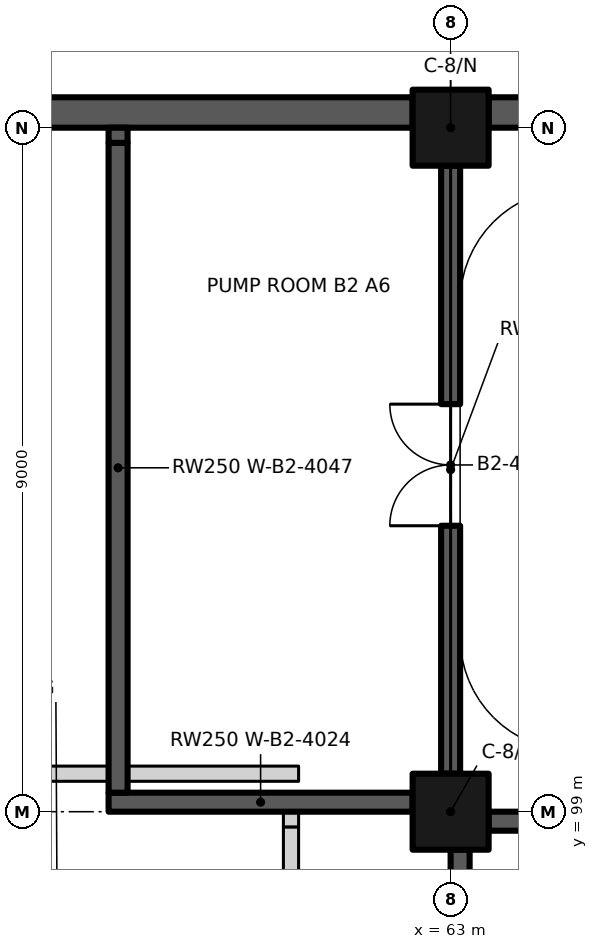
"""IFC4 building model, lengths in metres.
Left out: names, types, materials, properties, quantities, classifications, styles, units other than length and angle.
Written with IfcOpenShell. Run it as: python <this file> out.ifc"""

import sys

from ifc_helpers import new_model, si_unit, direction, frame, frame_2d, origin, origin_2d, place, context, subcontext, project, spatial, rectangle, extrude, element, fill, save


model = new_model("IFC4")
c1 = context("Model", 3, precision=1e-05, world=origin(), true_north=direction((0.0, 1.0)))
c2 = subcontext(c1, "Body", "Model", "MODEL_VIEW")
j1 = project(units=[si_unit("LENGTHUNIT", "METRE"), si_unit("PLANEANGLEUNIT", "RADIAN")], contexts=[c1])
p1 = place(None, origin())
s1 = spatial("IfcSite", under=j1, at=p1, CompositionType="ELEMENT")
p2 = place(p1, origin())
s2 = spatial("IfcBuilding", under=s1, at=p2, CompositionType="ELEMENT")
p3 = place(p2, frame((0.0, 0.0, -9.9)))
s3 = spatial("IfcBuildingStorey", under=s2, at=p3, CompositionType="ELEMENT", Elevation=-9.9)
p4 = place(p3, frame((54.5, 108.2, -0.5), z_axis=(0.0, 0.0, 1.0), x_axis=(1.0, 0.0, 0.0)))
e1 = element("IfcWall", 1, at=p4, inside=s3, PredefinedType="SOLIDWALL", context=c2, shape_type="SweptSolid", body=[
    extrude(rectangle(XDim=8.0, YDim=0.4, at=frame_2d((4.0, 0.0))), origin(), (0.0, 0.0, 1.0), 5.3),
])
p5 = place(p3, frame((63.5, 108.2, -0.5), z_axis=(0.0, 0.0, 1.0), x_axis=(1.0, 0.0, 0.0)))
e2 = element("IfcWall", 2, at=p5, inside=s3, PredefinedType="SOLIDWALL", context=c2, shape_type="SweptSolid", body=[
    extrude(rectangle(XDim=8.05, YDim=0.4, at=frame_2d((4.025, 0.0))), origin(), (0.0, 0.0, 1.0), 5.3),
])
for number, where, z_axis, x_axis in (
    (3, (63.0, 99.0, 0.0), (0.0, 0.0, 1.0), (1.0, 0.0, 0.0)),
    (4, (63.0, 108.0, 0.0), (0.0, 0.0, 1.0), (1.0, 0.0, 0.0)),
):
    element("IfcColumn", number, at=place(p3, frame(where, z_axis=z_axis, x_axis=x_axis)), inside=s3, PredefinedType="COLUMN", context=c2, shape_type="SweptSolid", body=[
        extrude(rectangle(XDim=1.0, YDim=1.0, at=origin_2d()), origin(), (0.0, 0.0, 1.0), 4.8),
    ])
p6 = place(p3, frame((63.5, 98.875, 0.0), z_axis=(0.0, 0.0, 1.0), x_axis=(1.0, 0.0, 0.0)))
e5 = element("IfcWall", 5, at=p6, inside=s3, PredefinedType="SHEAR", context=c2, shape_type="SweptSolid", body=[
    extrude(rectangle(XDim=1.75, YDim=0.25, at=frame_2d((0.875, 0.0))), origin(), (0.0, 0.0, 1.0), 4.8),
])
p7 = place(p3, frame((63.125, 90.5, 0.0), z_axis=(0.0, 0.0, 1.0), x_axis=(0.0, 1.0, 0.0)))
e6 = element("IfcWall", 6, at=p7, inside=s3, PredefinedType="SHEAR", context=c2, shape_type="SweptSolid", body=[
    extrude(rectangle(XDim=8.0, YDim=0.25, at=frame_2d((4.0, 0.0))), origin(), (0.0, 0.0, 1.0), 4.8),
])
p8 = place(p3, frame((58.5, 99.125, 0.0), z_axis=(0.0, 0.0, 1.0), x_axis=(1.0, 0.0, 0.0)))
e7 = element("IfcWall", 7, at=p8, inside=s3, PredefinedType="SOLIDWALL", context=c2, shape_type="SweptSolid", body=[
    extrude(rectangle(XDim=4.0, YDim=0.25, at=frame_2d((2.0, 0.0))), origin(), (0.0, 0.0, 1.0), 4.0),
])
p9 = place(p3, frame((54.65, 99.5, 0.0), z_axis=(0.0, 0.0, 1.0), x_axis=(1.0, 0.0, 0.0)))
e8 = element("IfcWall", 8, at=p9, inside=s3, PredefinedType="PARTITIONING", context=c2, shape_type="SweptSolid", body=[
    extrude(rectangle(XDim=3.85, YDim=0.2, at=frame_2d((1.925, 0.0))), origin(), (0.0, 0.0, 1.0), 4.5),
])
p10 = place(p3, frame((58.75, 99.5, 0.0), z_axis=(0.0, 0.0, 1.0), x_axis=(1.0, 0.0, 0.0)))
e9 = element("IfcWall", 9, at=p10, inside=s3, PredefinedType="PARTITIONING", context=c2, shape_type="SweptSolid", body=[
    extrude(rectangle(XDim=2.25, YDim=0.2, at=frame_2d((1.125, 0.0))), origin(), (0.0, 0.0, 1.0), 4.5),
])
p11 = place(p3, frame((58.625, 99.25, 0.0), z_axis=(0.0, 0.0, 1.0), x_axis=(0.0, 1.0, 0.0)))
e10 = element("IfcWall", 10, at=p11, inside=s3, PredefinedType="SOLIDWALL", context=c2, shape_type="SweptSolid", body=[
    extrude(rectangle(XDim=8.55, YDim=0.25, at=frame_2d((4.275, 0.0))), origin(), (0.0, 0.0, 1.0), 4.5),
])
p12 = place(p3, frame((58.625, 107.8, 0.0), z_axis=(0.0, 0.0, 1.0), x_axis=(0.0, 1.0, 0.0)))
e11 = element("IfcWall", 11, at=p12, inside=s3, PredefinedType="SOLIDWALL", context=c2, shape_type="SweptSolid", body=[
    extrude(rectangle(XDim=0.2, YDim=0.25, at=frame_2d((0.1, 0.0))), origin(), (0.0, 0.0, 1.0), 4.0),
])
p13 = place(p3, frame((60.9, 95.8, 0.0), z_axis=(0.0, 0.0, 1.0), x_axis=(0.0, 1.0, 0.0)))
e12 = element("IfcWall", 12, at=p13, inside=s3, PredefinedType="PARTITIONING", context=c2, shape_type="SweptSolid", body=[
    extrude(rectangle(XDim=3.0, YDim=0.2, at=frame_2d((1.5, 0.0))), origin(), (0.0, 0.0, 1.0), 4.5),
])
p14 = place(p3, frame((60.9, 98.8, 0.0), z_axis=(0.0, 0.0, 1.0), x_axis=(0.0, 1.0, 0.0)))
e13 = element("IfcWall", 13, at=p14, inside=s3, PredefinedType="PARTITIONING", context=c2, shape_type="SweptSolid", body=[
    extrude(rectangle(XDim=0.2, YDim=0.2, at=frame_2d((0.1, 0.0))), origin(), (0.0, 0.0, 1.0), 4.0),
])
p15 = place(p3, frame((63.0, 99.5, 0.0), z_axis=(0.0, 0.0, 1.0), x_axis=(0.0, 1.0, 0.0)))
e14 = element("IfcWall", 14, at=p15, inside=s3, PredefinedType="SOLIDWALL", context=c2, shape_type="SweptSolid", body=[
    extrude(rectangle(XDim=8.0, YDim=0.25, at=frame_2d((4.0, 0.0))), origin(), (0.0, 0.0, 1.0), 4.0),
])
p16 = place(p15, frame((3.262, 0.0, 0.0)))
e15 = element("IfcOpeningElement", 15, at=p16, cuts=e14, PredefinedType="OPENING", context=c2, shape_type="SweptSolid", body=[
    extrude(rectangle(XDim=1.6, YDim=2.1, at=frame_2d((0.8, 1.05))), frame((0.0, 0.135, 0.0), z_axis=(0.0, -1.0, 0.0), x_axis=(1.0, 0.0, 0.0)), (0.0, 0.0, 1.0), 0.27),
])
p17 = place(p16, origin())
e16 = element("IfcDoor", 16, at=p17, inside=s3, OperationType="DOUBLE_DOOR_SINGLE_SWING", PredefinedType="DOOR", context=c2, shape_type="SweptSolid", body=[
    extrude(rectangle(XDim=1.6, YDim=2.1, at=frame_2d((0.8, 1.05))), frame((0.0, 0.025, 0.0), z_axis=(0.0, -1.0, 0.0), x_axis=(1.0, 0.0, 0.0)), (0.0, 0.0, 1.0), 0.05),
])
fill(e15, e16)
save(model, sys.argv[1])
